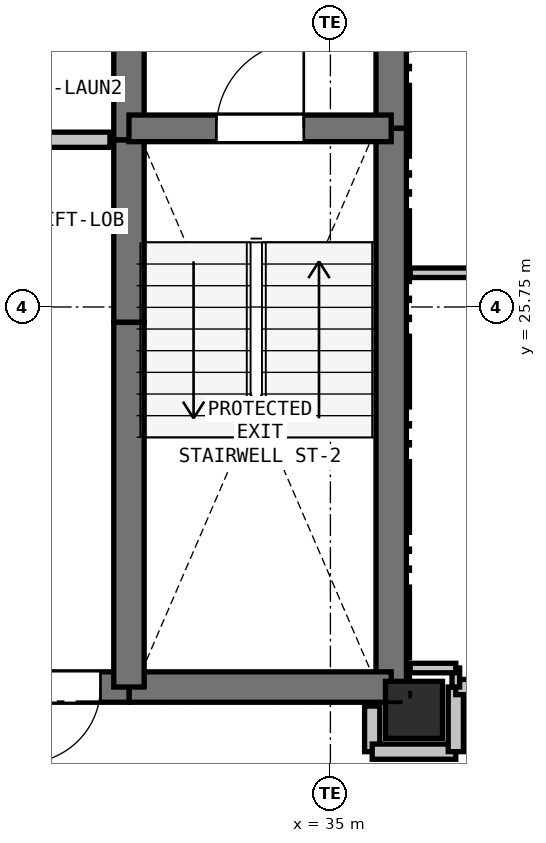
"""IFC4 building model, lengths in metres.
Left out: names, types, materials, properties, quantities, classifications, styles, units other than length and angle.
Written with IfcOpenShell. Run it as: python <this file> out.ifc"""

import sys

from ifc_helpers import new_model, si_unit, direction, frame, frame_2d, origin, origin_2d, place, context, subcontext, project, spatial, rectangle, extrude, element, fill, save


model = new_model("IFC4")
c1 = context("Model", 3, precision=1e-05, world=origin(), true_north=direction((0.0, 1.0)))
c2 = subcontext(c1, "Body", "Model", "MODEL_VIEW")
j1 = project(units=[si_unit("LENGTHUNIT", "METRE"), si_unit("PLANEANGLEUNIT", "RADIAN")], contexts=[c1])
p1 = place(None, origin())
s1 = spatial("IfcSite", under=j1, at=p1, CompositionType="ELEMENT")
p2 = place(p1, origin())
s2 = spatial("IfcBuilding", under=s1, at=p2, CompositionType="ELEMENT")
p3 = place(p2, frame((0.0, 0.0, 144.3)))
s3 = spatial("IfcBuildingStorey", under=s2, at=p3, CompositionType="ELEMENT", Elevation=144.3)
p4 = place(p3, frame((36.1, 20.45, 0.0), z_axis=(0.0, 0.0, 1.0), x_axis=(1.0, 0.0, 0.0)))
e1 = element("IfcColumn", 1, at=p4, inside=s3, PredefinedType="COLUMN", context=c2, shape_type="SweptSolid", body=[
    extrude(rectangle(XDim=0.75, YDim=0.75, at=origin_2d()), origin(), (0.0, 0.0, 1.0), 3.3),
])
p5 = place(p3, frame((35.8, 32.75, 0.0), z_axis=(0.0, 0.0, 1.0), x_axis=(0.0, -1.0, 0.0)))
e2 = element("IfcWall", 2, at=p5, inside=s3, PredefinedType="SHEAR", context=c2, shape_type="SweptSolid", body=[
    extrude(rectangle(XDim=4.65, YDim=0.4, at=frame_2d((2.325, 0.0))), origin(), (0.0, 0.0, 1.0), 3.06),
])
p6 = place(p3, frame((35.8, 28.1, 0.0), z_axis=(0.0, 0.0, 1.0), x_axis=(0.0, -1.0, 0.0)))
e3 = element("IfcWall", 3, at=p6, inside=s3, PredefinedType="SHEAR", context=c2, shape_type="SweptSolid", body=[
    extrude(rectangle(XDim=7.35, YDim=0.4, at=frame_2d((3.675, 0.0))), origin(), (0.0, 0.0, 1.0), 3.06),
])
p7 = place(p3, frame((35.8, 20.75, 0.0), z_axis=(0.0, 0.0, 1.0), x_axis=(-1.0, 0.0, 0.0)))
e4 = element("IfcWall", 4, at=p7, inside=s3, PredefinedType="SHEAR", context=c2, shape_type="SweptSolid", body=[
    extrude(rectangle(XDim=3.45, YDim=0.4, at=frame_2d((1.725, 0.0))), origin(), (0.0, 0.0, 1.0), 3.06),
])
p8 = place(p3, frame((32.35, 20.75, 0.0), z_axis=(0.0, 0.0, 1.0), x_axis=(-1.0, 0.0, 0.0)))
e5 = element("IfcWall", 5, at=p8, inside=s3, PredefinedType="SHEAR", context=c2, shape_type="SweptSolid", body=[
    extrude(rectangle(XDim=1.75, YDim=0.4, at=frame_2d((0.875, 0.0))), origin(), (0.0, 0.0, 1.0), 3.06),
])
p9 = place(p8, frame((0.375, 0.0, 0.0)))
e6 = element("IfcOpeningElement", 6, at=p9, cuts=e5, PredefinedType="OPENING", context=c2, shape_type="SweptSolid", body=[
    extrude(rectangle(XDim=1.0, YDim=2.15, at=frame_2d((0.5, 1.075))), frame((0.0, 0.21, 0.0), z_axis=(0.0, -1.0, 0.0), x_axis=(1.0, 0.0, 0.0)), (0.0, 0.0, 1.0), 0.42),
])
p10 = place(p3, frame((32.35, 20.75, 0.0), z_axis=(0.0, 0.0, 1.0), x_axis=(0.0, 1.0, 0.0)))
e7 = element("IfcWall", 7, at=p10, inside=s3, PredefinedType="SHEAR", context=c2, shape_type="SweptSolid", body=[
    extrude(rectangle(XDim=4.8, YDim=0.4, at=frame_2d((2.4, 0.0))), origin(), (0.0, 0.0, 1.0), 3.06),
])
p11 = place(p3, frame((32.35, 25.55, 0.0), z_axis=(0.0, 0.0, 1.0), x_axis=(0.0, 1.0, 0.0)))
e8 = element("IfcWall", 8, at=p11, inside=s3, PredefinedType="SHEAR", context=c2, shape_type="SweptSolid", body=[
    extrude(rectangle(XDim=2.4, YDim=0.4, at=frame_2d((1.2, 0.0))), origin(), (0.0, 0.0, 1.0), 3.06),
])
p12 = place(p3, frame((32.35, 27.95, 0.0), z_axis=(0.0, 0.0, 1.0), x_axis=(0.0, 1.0, 0.0)))
e9 = element("IfcWall", 9, at=p12, inside=s3, PredefinedType="SHEAR", context=c2, shape_type="SweptSolid", body=[
    extrude(rectangle(XDim=2.8, YDim=0.4, at=frame_2d((1.4, 0.0))), origin(), (0.0, 0.0, 1.0), 3.06),
])
p13 = place(p3, frame((32.35, 28.1, 0.0), z_axis=(0.0, 0.0, 1.0), x_axis=(1.0, 0.0, 0.0)))
e10 = element("IfcWall", 10, at=p13, inside=s3, PredefinedType="SHEAR", context=c2, shape_type="SweptSolid", body=[
    extrude(rectangle(XDim=3.45, YDim=0.35, at=frame_2d((1.725, 0.0))), origin(), (0.0, 0.0, 1.0), 3.06),
])
p14 = place(p13, frame((1.15, 0.0, 0.0)))
e11 = element("IfcOpeningElement", 11, at=p14, cuts=e10, PredefinedType="OPENING", context=c2, shape_type="SweptSolid", body=[
    extrude(rectangle(XDim=1.15, YDim=2.15, at=frame_2d((0.575, 1.075))), frame((0.0, 0.185, 0.0), z_axis=(0.0, -1.0, 0.0), x_axis=(1.0, 0.0, 0.0)), (0.0, 0.0, 1.0), 0.37),
])
p15 = place(p3, frame((27.4, 27.95, 0.0), z_axis=(0.0, 0.0, 1.0), x_axis=(1.0, 0.0, 0.0)))
e12 = element("IfcWall", 12, at=p15, inside=s3, PredefinedType="PARTITIONING", context=c2, shape_type="SweptSolid", body=[
    extrude(rectangle(XDim=4.7, YDim=0.2, at=frame_2d((2.35, 0.0))), origin(), (0.0, 0.0, 1.0), 3.06),
])
p16 = place(p15, frame((1.85, 0.0, 0.0)))
e13 = element("IfcOpeningElement", 13, at=p16, cuts=e12, PredefinedType="OPENING", context=c2, shape_type="SweptSolid", body=[
    extrude(rectangle(XDim=1.0, YDim=2.15, at=frame_2d((0.5, 1.075))), frame((0.0, 0.11, 0.0), z_axis=(0.0, -1.0, 0.0), x_axis=(1.0, 0.0, 0.0)), (0.0, 0.0, 1.0), 0.22),
])
p17 = place(p3, frame((35.55, 20.5, 0.0), z_axis=(0.0, 0.0, 1.0), x_axis=(0.0, -1.0, 0.0)))
e14 = element("IfcWall", 14, at=p17, inside=s3, PredefinedType="PARTITIONING", context=c2, shape_type="SweptSolid", body=[
    extrude(rectangle(XDim=0.6, YDim=0.2, at=frame_2d((0.3, 0.0))), origin(), (0.0, 0.0, 1.0), 2.585),
])
p18 = place(p3, frame((35.55, 19.9, 0.0), z_axis=(0.0, 0.0, 1.0), x_axis=(1.0, 0.0, 0.0)))
e15 = element("IfcWall", 15, at=p18, inside=s3, PredefinedType="PARTITIONING", context=c2, shape_type="SweptSolid", body=[
    extrude(rectangle(XDim=1.1, YDim=0.2, at=frame_2d((0.55, 0.0))), origin(), (0.0, 0.0, 1.0), 2.433),
])
p19 = place(p3, frame((36.65, 19.9, 0.0), z_axis=(0.0, 0.0, 1.0), x_axis=(0.0, 1.0, 0.0)))
e16 = element("IfcWall", 16, at=p19, inside=s3, PredefinedType="PARTITIONING", context=c2, shape_type="SweptSolid", body=[
    extrude(rectangle(XDim=0.85, YDim=0.2, at=frame_2d((0.425, 0.0))), origin(), (0.0, 0.0, 1.0), 3.06),
])
p20 = place(p3, frame((36.65, 20.75, 0.0), z_axis=(0.0, 0.0, 1.0), x_axis=(1.0, 0.0, 0.0)))
e17 = element("IfcWall", 17, at=p20, inside=s3, PredefinedType="PARTITIONING", context=c2, shape_type="SweptSolid", body=[
    extrude(rectangle(XDim=2.55, YDim=0.2, at=frame_2d((1.275, 0.0))), origin(), (0.0, 0.0, 1.0), 3.06),
])
p21 = place(p20, frame((0.775, 0.0, 0.0)))
e18 = element("IfcOpeningElement", 18, at=p21, cuts=e17, PredefinedType="OPENING", context=c2, shape_type="SweptSolid", body=[
    extrude(rectangle(XDim=1.0, YDim=2.15, at=frame_2d((0.5, 1.075))), frame((0.0, 0.11, 0.0), z_axis=(0.0, -1.0, 0.0), x_axis=(1.0, 0.0, 0.0)), (0.0, 0.0, 1.0), 0.22),
])
p22 = place(p3, frame((42.181, 26.2, 0.0), z_axis=(0.0, 0.0, 1.0), x_axis=(-1.0, 0.0, 0.0)))
e19 = element("IfcWall", 19, at=p22, inside=s3, PredefinedType="PARTITIONING", context=c2, shape_type="SweptSolid", body=[
    extrude(rectangle(XDim=6.131, YDim=0.125, at=frame_2d((3.065, 0.0))), origin(), (0.0, 0.0, 1.0), 2.365),
])
p23 = place(p3, frame((36.65, 20.75, 0.0), z_axis=(0.0, 0.0, 1.0), x_axis=(0.0, 1.0, 0.0)))
e20 = element("IfcWall", 20, at=p23, inside=s3, PredefinedType="PARTITIONING", context=c2, shape_type="SweptSolid", body=[
    extrude(rectangle(XDim=0.25, YDim=0.1, at=frame_2d((0.125, 0.0))), origin(), (0.0, 0.0, 1.0), 3.06),
])
p24 = place(p3, frame((36.65, 21.0, 0.0), z_axis=(0.0, 0.0, 1.0), x_axis=(-1.0, 0.0, 0.0)))
e21 = element("IfcWall", 21, at=p24, inside=s3, PredefinedType="PARTITIONING", context=c2, shape_type="SweptSolid", body=[
    extrude(rectangle(XDim=0.6, YDim=0.125, at=frame_2d((0.3, 0.0))), origin(), (0.0, 0.0, 1.0), 2.585),
])
p25 = place(p9, origin())
e22 = element("IfcDoor", 22, at=p25, inside=s3, OperationType="SINGLE_SWING_RIGHT", PredefinedType="DOOR", context=c2, shape_type="SweptSolid", body=[
    extrude(rectangle(XDim=1.0, YDim=2.15, at=frame_2d((0.5, 1.075))), frame((0.0, 0.025, 0.0), z_axis=(0.0, -1.0, 0.0), x_axis=(1.0, 0.0, 0.0)), (0.0, 0.0, 1.0), 0.05),
])
fill(e6, e22)
p26 = place(p14, origin())
e23 = element("IfcDoor", 23, at=p26, inside=s3, OperationType="SINGLE_SWING_RIGHT", PredefinedType="DOOR", context=c2, shape_type="SweptSolid", body=[
    extrude(rectangle(XDim=1.15, YDim=2.15, at=frame_2d((0.575, 1.075))), frame((0.0, 0.025, 0.0), z_axis=(0.0, -1.0, 0.0), x_axis=(1.0, 0.0, 0.0)), (0.0, 0.0, 1.0), 0.05),
])
fill(e11, e23)
save(model, sys.argv[1])
